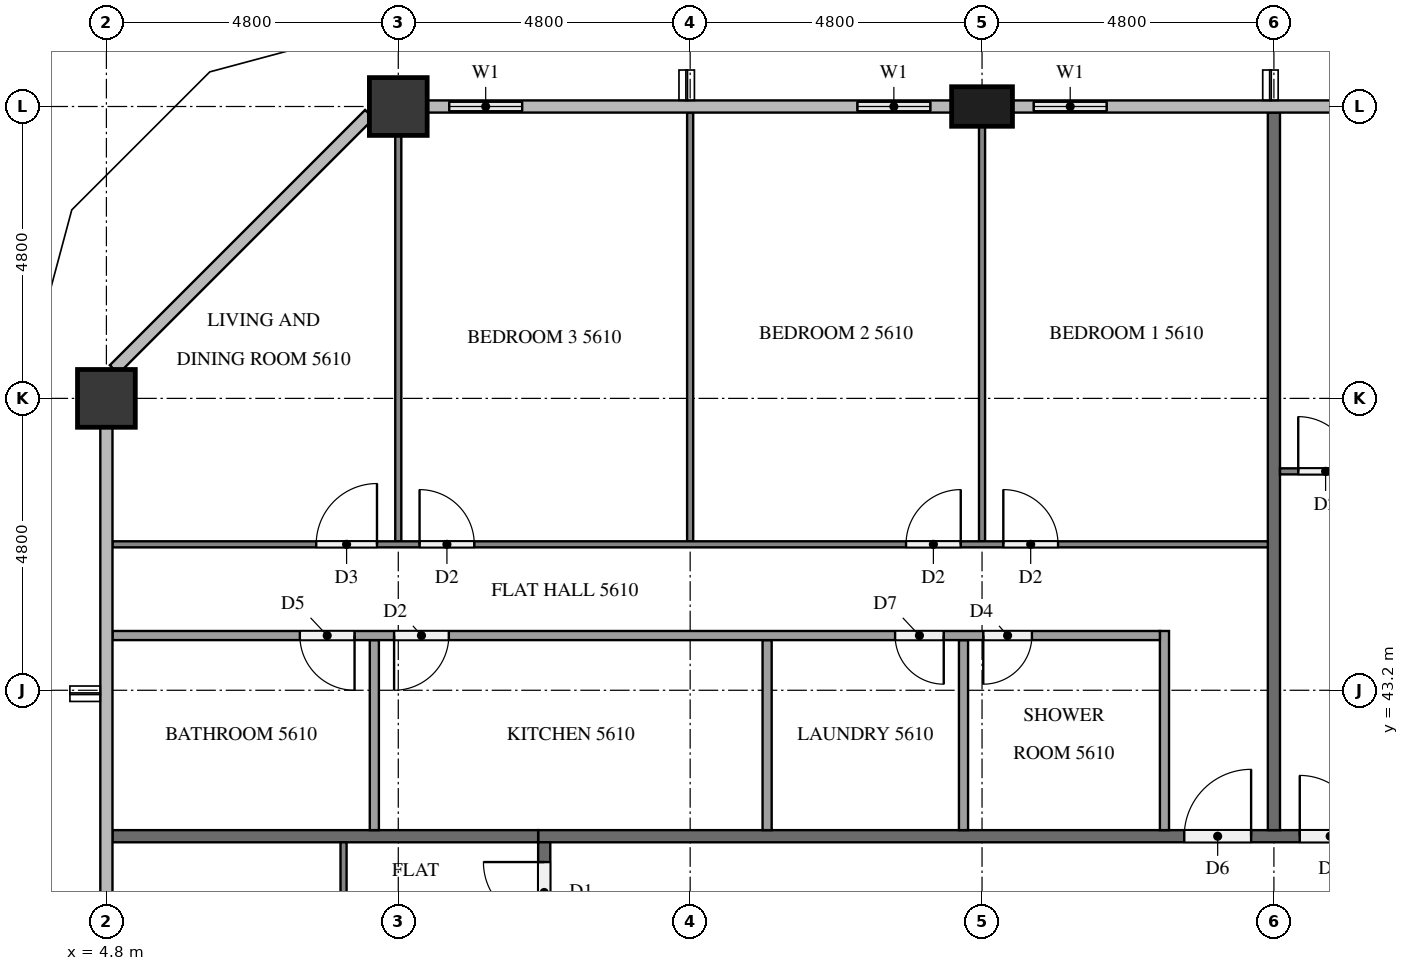
"""IFC4 building model, lengths in metres.
Left out: names, types, materials, properties, quantities, classifications, styles, units other than length and angle.
Written with IfcOpenShell. Run it as: python <this file> out.ifc"""

import sys

from ifc_helpers import new_model, si_unit, direction, frame, frame_2d, origin, origin_2d, place, context, subcontext, project, spatial, rectangle, extrude, element, fill, save


model = new_model("IFC4")
c1 = context("Model", 3, precision=1e-05, world=origin(), true_north=direction((0.0, 1.0)))
c2 = subcontext(c1, "Body", "Model", "MODEL_VIEW")
j1 = project(units=[si_unit("LENGTHUNIT", "METRE"), si_unit("PLANEANGLEUNIT", "RADIAN")], contexts=[c1])
p1 = place(None, origin())
s1 = spatial("IfcSite", under=j1, at=p1, CompositionType="ELEMENT")
p2 = place(p1, origin())
s2 = spatial("IfcBuilding", under=s1, at=p2, CompositionType="ELEMENT")
p3 = place(p2, frame((0.0, 0.0, 215.8)))
s3 = spatial("IfcBuildingStorey", under=s2, at=p3, CompositionType="ELEMENT", Elevation=215.8)
p4 = place(p3, frame((19.2, 52.8, 0.0), z_axis=(0.0, 0.0, 1.0), x_axis=(1.0, 0.0, 0.0)))
e1 = element("IfcColumn", 1, at=p4, inside=s3, PredefinedType="COLUMN", context=c2, shape_type="SweptSolid", body=[
    extrude(rectangle(XDim=1.0, YDim=0.65, at=origin_2d()), origin(), (0.0, 0.0, 1.0), 3.2),
])
for number, where, z_axis, x_axis in (
    (2, (9.6, 52.8, 0.0), (0.0, 0.0, 1.0), (1.0, 0.0, 0.0)),
    (3, (4.8, 48.0, 0.0), (0.0, 0.0, 1.0), (1.0, 0.0, 0.0)),
):
    element("IfcColumn", number, at=place(p3, frame(where, z_axis=z_axis, x_axis=x_axis)), inside=s3, PredefinedType="COLUMN", context=c2, shape_type="SweptSolid", body=[
        extrude(rectangle(XDim=0.95, YDim=0.95, at=origin_2d()), origin(), (0.0, 0.0, 1.0), 3.2),
    ])
p5 = place(p3, frame((21.6, 52.8, 0.0), z_axis=(0.0, 0.0, 1.0), x_axis=(-1.0, 0.0, 0.0)))
e4 = element("IfcWall", 4, at=p5, inside=s3, PredefinedType="SOLIDWALL", context=c2, shape_type="SweptSolid", body=[
    extrude(rectangle(XDim=1.9, YDim=0.15, at=frame_2d((0.95, 0.0))), origin(), (0.0, 0.0, 1.0), 3.2),
])
p6 = place(p5, frame((0.35, 0.0, 0.9)))
e5 = element("IfcOpeningElement", 5, at=p6, cuts=e4, PredefinedType="OPENING", context=c2, shape_type="SweptSolid", body=[
    extrude(rectangle(XDim=1.2, YDim=1.4, at=frame_2d((0.6, 0.7))), frame((0.0, 0.085, 0.0), z_axis=(0.0, -1.0, 0.0), x_axis=(1.0, 0.0, 0.0)), (0.0, 0.0, 1.0), 0.17),
])
p7 = place(p3, frame((18.7, 52.8, 0.0), z_axis=(0.0, 0.0, 1.0), x_axis=(-1.0, 0.0, 0.0)))
e6 = element("IfcWall", 6, at=p7, inside=s3, PredefinedType="SOLIDWALL", context=c2, shape_type="SweptSolid", body=[
    extrude(rectangle(XDim=1.9, YDim=0.15, at=frame_2d((0.95, 0.0))), origin(), (0.0, 0.0, 1.0), 3.2),
])
p8 = place(p7, frame((0.35, 0.0, 0.9)))
e7 = element("IfcOpeningElement", 7, at=p8, cuts=e6, PredefinedType="OPENING", context=c2, shape_type="SweptSolid", body=[
    extrude(rectangle(XDim=1.2, YDim=1.4, at=frame_2d((0.6, 0.7))), frame((0.0, 0.085, 0.0), z_axis=(0.0, -1.0, 0.0), x_axis=(1.0, 0.0, 0.0)), (0.0, 0.0, 1.0), 0.17),
])
p9 = place(p3, frame((12.0, 52.8, 0.0), z_axis=(0.0, 0.0, 1.0), x_axis=(-1.0, 0.0, 0.0)))
e8 = element("IfcWall", 8, at=p9, inside=s3, PredefinedType="SOLIDWALL", context=c2, shape_type="SweptSolid", body=[
    extrude(rectangle(XDim=1.925, YDim=0.15, at=frame_2d((0.962, 0.0))), origin(), (0.0, 0.0, 1.0), 3.2),
])
p10 = place(p9, frame((0.363, 0.0, 0.9)))
e9 = element("IfcOpeningElement", 9, at=p10, cuts=e8, PredefinedType="OPENING", context=c2, shape_type="SweptSolid", body=[
    extrude(rectangle(XDim=1.2, YDim=1.4, at=frame_2d((0.6, 0.7))), frame((0.0, 0.085, 0.0), z_axis=(0.0, -1.0, 0.0), x_axis=(1.0, 0.0, 0.0)), (0.0, 0.0, 1.0), 0.17),
])
p11 = place(p3, frame((11.9, 40.8, 0.0), z_axis=(0.0, 0.0, 1.0), x_axis=(1.0, 0.0, 0.0)))
e10 = element("IfcWall", 10, at=p11, inside=s3, PredefinedType="PARTITIONING", context=c2, shape_type="SweptSolid", body=[
    extrude(rectangle(XDim=38.6, YDim=0.2, at=frame_2d((19.3, 0.0))), origin(), (0.0, 0.0, 1.0), 3.2),
])
p12 = place(p11, frame((36.525, 0.0, 0.0)))
e11 = element("IfcOpeningElement", 11, at=p12, cuts=e10, PredefinedType="OPENING", context=c2, shape_type="SweptSolid", body=[
    extrude(rectangle(XDim=1.0, YDim=2.1, at=frame_2d((0.5, 1.05))), frame((0.0, 0.11, 0.0), z_axis=(0.0, -1.0, 0.0), x_axis=(1.0, 0.0, 0.0)), (0.0, 0.0, 1.0), 0.22),
])
p13 = place(p11, frame((29.325, 0.0, 0.0)))
e12 = element("IfcOpeningElement", 12, at=p13, cuts=e10, PredefinedType="OPENING", context=c2, shape_type="SweptSolid", body=[
    extrude(rectangle(XDim=1.0, YDim=2.1, at=frame_2d((0.5, 1.05))), frame((0.0, 0.11, 0.0), z_axis=(0.0, -1.0, 0.0), x_axis=(1.0, 0.0, 0.0)), (0.0, 0.0, 1.0), 0.22),
])
p14 = place(p11, frame((12.525, 0.0, 0.0)))
e13 = element("IfcOpeningElement", 13, at=p14, cuts=e10, PredefinedType="OPENING", context=c2, shape_type="SweptSolid", body=[
    extrude(rectangle(XDim=1.0, YDim=2.1, at=frame_2d((0.5, 1.05))), frame((0.0, 0.11, 0.0), z_axis=(0.0, -1.0, 0.0), x_axis=(1.0, 0.0, 0.0)), (0.0, 0.0, 1.0), 0.22),
])
p15 = place(p11, frame((10.625, 0.0, 0.0)))
e14 = element("IfcOpeningElement", 14, at=p15, cuts=e10, PredefinedType="OPENING", context=c2, shape_type="SweptSolid", body=[
    extrude(rectangle(XDim=1.1, YDim=2.1, at=frame_2d((0.55, 1.05))), frame((0.0, 0.11, 0.0), z_axis=(0.0, -1.0, 0.0), x_axis=(1.0, 0.0, 0.0)), (0.0, 0.0, 1.0), 0.22),
])
p16 = place(p3, frame((12.0, 12.1, 0.0), z_axis=(0.0, 0.0, 1.0), x_axis=(0.0, 1.0, 0.0)))
e15 = element("IfcWall", 15, at=p16, inside=s3, PredefinedType="PARTITIONING", context=c2, shape_type="SweptSolid", body=[
    extrude(rectangle(XDim=28.6, YDim=0.2, at=frame_2d((14.3, 0.0))), origin(), (0.0, 0.0, 1.0), 3.2),
])
p17 = place(p16, frame((27.275, 0.0, 0.0)))
e16 = element("IfcOpeningElement", 16, at=p17, cuts=e15, PredefinedType="OPENING", context=c2, shape_type="SweptSolid", body=[
    extrude(rectangle(XDim=1.0, YDim=2.1, at=frame_2d((0.5, 1.05))), frame((0.0, 0.11, 0.0), z_axis=(0.0, -1.0, 0.0), x_axis=(1.0, 0.0, 0.0)), (0.0, 0.0, 1.0), 0.22),
])
p18 = place(p16, frame((12.325, 0.0, 0.0)))
e17 = element("IfcOpeningElement", 17, at=p18, cuts=e15, PredefinedType="OPENING", context=c2, shape_type="SweptSolid", body=[
    extrude(rectangle(XDim=1.0, YDim=2.1, at=frame_2d((0.5, 1.05))), frame((0.0, 0.11, 0.0), z_axis=(0.0, -1.0, 0.0), x_axis=(1.0, 0.0, 0.0)), (0.0, 0.0, 1.0), 0.22),
])
p19 = place(p16, frame((2.725, 0.0, 0.0)))
e18 = element("IfcOpeningElement", 18, at=p19, cuts=e15, PredefinedType="OPENING", context=c2, shape_type="SweptSolid", body=[
    extrude(rectangle(XDim=1.0, YDim=2.1, at=frame_2d((0.5, 1.05))), frame((0.0, 0.11, 0.0), z_axis=(0.0, -1.0, 0.0), x_axis=(1.0, 0.0, 0.0)), (0.0, 0.0, 1.0), 0.22),
])
p20 = place(p16, frame((0.875, 0.0, 0.0)))
e19 = element("IfcOpeningElement", 19, at=p20, cuts=e15, PredefinedType="OPENING", context=c2, shape_type="SweptSolid", body=[
    extrude(rectangle(XDim=1.0, YDim=2.1, at=frame_2d((0.5, 1.05))), frame((0.0, 0.11, 0.0), z_axis=(0.0, -1.0, 0.0), x_axis=(1.0, 0.0, 0.0)), (0.0, 0.0, 1.0), 0.22),
])
p21 = place(p3, frame((24.0, 52.7, 0.0), z_axis=(0.0, 0.0, 1.0), x_axis=(0.0, -1.0, 0.0)))
e20 = element("IfcWall", 20, at=p21, inside=s3, PredefinedType="PARTITIONING", context=c2, shape_type="SweptSolid", body=[
    extrude(rectangle(XDim=11.8, YDim=0.2, at=frame_2d((5.9, 0.0))), origin(), (0.0, 0.0, 1.0), 3.2),
])
p22 = place(p3, frame((4.9, 40.8, 0.0), z_axis=(0.0, 0.0, 1.0), x_axis=(1.0, 0.0, 0.0)))
e21 = element("IfcWall", 21, at=p22, inside=s3, PredefinedType="PARTITIONING", context=c2, shape_type="SweptSolid", body=[
    extrude(rectangle(XDim=7.0, YDim=0.2, at=frame_2d((3.5, 0.0))), origin(), (0.0, 0.0, 1.0), 3.2),
])
p23 = place(p3, frame((24.1, 46.8, 0.0), z_axis=(0.0, 0.0, 1.0), x_axis=(1.0, 0.0, 0.0)))
e22 = element("IfcWall", 22, at=p23, inside=s3, PredefinedType="PARTITIONING", context=c2, shape_type="SweptSolid", body=[
    extrude(rectangle(XDim=16.6, YDim=0.1, at=frame_2d((8.3, 0.0))), origin(), (0.0, 0.0, 1.0), 3.2),
])
p24 = place(p23, frame((0.3, 0.0, 0.0)))
e23 = element("IfcOpeningElement", 23, at=p24, cuts=e22, PredefinedType="OPENING", context=c2, shape_type="SweptSolid", body=[
    extrude(rectangle(XDim=0.9, YDim=2.1, at=frame_2d((0.45, 1.05))), frame((0.0, 0.06, 0.0), z_axis=(0.0, -1.0, 0.0), x_axis=(1.0, 0.0, 0.0)), (0.0, 0.0, 1.0), 0.12),
])
p25 = place(p23, frame((10.55, 0.0, 0.0)))
e24 = element("IfcOpeningElement", 24, at=p25, cuts=e22, PredefinedType="OPENING", context=c2, shape_type="SweptSolid", body=[
    extrude(rectangle(XDim=1.0, YDim=2.1, at=frame_2d((0.5, 1.05))), frame((0.0, 0.06, 0.0), z_axis=(0.0, -1.0, 0.0), x_axis=(1.0, 0.0, 0.0)), (0.0, 0.0, 1.0), 0.12),
])
p26 = place(p23, frame((12.25, 0.0, 0.0)))
e25 = element("IfcOpeningElement", 25, at=p26, cuts=e22, PredefinedType="OPENING", context=c2, shape_type="SweptSolid", body=[
    extrude(rectangle(XDim=0.9, YDim=2.1, at=frame_2d((0.45, 1.05))), frame((0.0, 0.06, 0.0), z_axis=(0.0, -1.0, 0.0), x_axis=(1.0, 0.0, 0.0)), (0.0, 0.0, 1.0), 0.12),
])
p27 = place(p3, frame((19.2, 45.65, 0.0), z_axis=(0.0, 0.0, 1.0), x_axis=(0.0, 1.0, 0.0)))
e26 = element("IfcWall", 26, at=p27, inside=s3, PredefinedType="PARTITIONING", context=c2, shape_type="SweptSolid", body=[
    extrude(rectangle(XDim=6.825, YDim=0.1, at=frame_2d((3.413, 0.0))), origin(), (0.0, 0.0, 1.0), 3.2),
])
p28 = place(p3, frame((14.4, 45.65, 0.0), z_axis=(0.0, 0.0, 1.0), x_axis=(0.0, 1.0, 0.0)))
e27 = element("IfcWall", 27, at=p28, inside=s3, PredefinedType="PARTITIONING", context=c2, shape_type="SweptSolid", body=[
    extrude(rectangle(XDim=7.05, YDim=0.1, at=frame_2d((3.525, 0.0))), origin(), (0.0, 0.0, 1.0), 3.2),
])
p29 = place(p3, frame((9.6, 45.65, 0.0), z_axis=(0.0, 0.0, 1.0), x_axis=(0.0, 1.0, 0.0)))
e28 = element("IfcWall", 28, at=p29, inside=s3, PredefinedType="PARTITIONING", context=c2, shape_type="SweptSolid", body=[
    extrude(rectangle(XDim=6.675, YDim=0.1, at=frame_2d((3.337, 0.0))), origin(), (0.0, 0.0, 1.0), 3.2),
])
p30 = place(p3, frame((4.9, 45.6, 0.0), z_axis=(0.0, 0.0, 1.0), x_axis=(1.0, 0.0, 0.0)))
e29 = element("IfcWall", 29, at=p30, inside=s3, PredefinedType="PARTITIONING", context=c2, shape_type="SweptSolid", body=[
    extrude(rectangle(XDim=19.0, YDim=0.1, at=frame_2d((9.5, 0.0))), origin(), (0.0, 0.0, 1.0), 3.2),
])
p31 = place(p30, frame((14.65, 0.0, 0.0)))
e30 = element("IfcOpeningElement", 30, at=p31, cuts=e29, PredefinedType="OPENING", context=c2, shape_type="SweptSolid", body=[
    extrude(rectangle(XDim=0.9, YDim=2.1, at=frame_2d((0.45, 1.05))), frame((0.0, 0.06, 0.0), z_axis=(0.0, -1.0, 0.0), x_axis=(1.0, 0.0, 0.0)), (0.0, 0.0, 1.0), 0.12),
])
p32 = place(p30, frame((13.05, 0.0, 0.0)))
e31 = element("IfcOpeningElement", 31, at=p32, cuts=e29, PredefinedType="OPENING", context=c2, shape_type="SweptSolid", body=[
    extrude(rectangle(XDim=0.9, YDim=2.1, at=frame_2d((0.45, 1.05))), frame((0.0, 0.06, 0.0), z_axis=(0.0, -1.0, 0.0), x_axis=(1.0, 0.0, 0.0)), (0.0, 0.0, 1.0), 0.12),
])
p33 = place(p30, frame((5.05, 0.0, 0.0)))
e32 = element("IfcOpeningElement", 32, at=p33, cuts=e29, PredefinedType="OPENING", context=c2, shape_type="SweptSolid", body=[
    extrude(rectangle(XDim=0.9, YDim=2.1, at=frame_2d((0.45, 1.05))), frame((0.0, 0.06, 0.0), z_axis=(0.0, -1.0, 0.0), x_axis=(1.0, 0.0, 0.0)), (0.0, 0.0, 1.0), 0.12),
])
p34 = place(p30, frame((3.35, 0.0, 0.0)))
e33 = element("IfcOpeningElement", 33, at=p34, cuts=e29, PredefinedType="OPENING", context=c2, shape_type="SweptSolid", body=[
    extrude(rectangle(XDim=1.0, YDim=2.1, at=frame_2d((0.5, 1.05))), frame((0.0, 0.06, 0.0), z_axis=(0.0, -1.0, 0.0), x_axis=(1.0, 0.0, 0.0)), (0.0, 0.0, 1.0), 0.12),
])
for number, where, z_axis, x_axis in (
    (34, (18.895, 40.9, 0.0), (0.0, 0.0, 1.0), (0.0, 1.0, 0.0)),
    (35, (15.666, 40.9, 0.0), (0.0, 0.0, 1.0), (0.0, 1.0, 0.0)),
    (36, (9.206, 40.9, 0.0), (0.0, 0.0, 1.0), (0.0, 1.0, 0.0)),
):
    element("IfcWall", number, at=place(p3, frame(where, z_axis=z_axis, x_axis=x_axis)), inside=s3, PredefinedType="PARTITIONING", context=c2, shape_type="SweptSolid", body=[
        extrude(rectangle(XDim=3.125, YDim=0.15, at=frame_2d((1.562, 0.0))), origin(), (0.0, 0.0, 1.0), 3.2),
    ])
p35 = place(p3, frame((22.2, 40.9, 0.0), z_axis=(0.0, 0.0, 1.0), x_axis=(0.0, 1.0, 0.0)))
e37 = element("IfcWall", 37, at=p35, inside=s3, PredefinedType="PARTITIONING", context=c2, shape_type="SweptSolid", body=[
    extrude(rectangle(XDim=3.275, YDim=0.15, at=frame_2d((1.638, 0.0))), origin(), (0.0, 0.0, 1.0), 3.2),
])
p36 = place(p3, frame((22.125, 44.1, 0.0), z_axis=(0.0, 0.0, 1.0), x_axis=(-1.0, 0.0, 0.0)))
e38 = element("IfcWall", 38, at=p36, inside=s3, PredefinedType="PARTITIONING", context=c2, shape_type="SweptSolid", body=[
    extrude(rectangle(XDim=17.225, YDim=0.15, at=frame_2d((8.613, 0.0))), origin(), (0.0, 0.0, 1.0), 3.2),
])
p37 = place(p36, frame((2.105, 0.0, 0.0)))
e39 = element("IfcOpeningElement", 39, at=p37, cuts=e38, PredefinedType="OPENING", context=c2, shape_type="SweptSolid", body=[
    extrude(rectangle(XDim=0.8, YDim=2.1, at=frame_2d((0.4, 1.05))), frame((0.0, 0.085, 0.0), z_axis=(0.0, -1.0, 0.0), x_axis=(1.0, 0.0, 0.0)), (0.0, 0.0, 1.0), 0.17),
])
p38 = place(p36, frame((3.555, 0.0, 0.0)))
e40 = element("IfcOpeningElement", 40, at=p38, cuts=e38, PredefinedType="OPENING", context=c2, shape_type="SweptSolid", body=[
    extrude(rectangle(XDim=0.8, YDim=2.1, at=frame_2d((0.4, 1.05))), frame((0.0, 0.085, 0.0), z_axis=(0.0, -1.0, 0.0), x_axis=(1.0, 0.0, 0.0)), (0.0, 0.0, 1.0), 0.17),
])
p39 = place(p36, frame((11.694, 0.0, 0.0)))
e41 = element("IfcOpeningElement", 41, at=p39, cuts=e38, PredefinedType="OPENING", context=c2, shape_type="SweptSolid", body=[
    extrude(rectangle(XDim=0.9, YDim=2.1, at=frame_2d((0.45, 1.05))), frame((0.0, 0.085, 0.0), z_axis=(0.0, -1.0, 0.0), x_axis=(1.0, 0.0, 0.0)), (0.0, 0.0, 1.0), 0.17),
])
p40 = place(p36, frame((13.244, 0.0, 0.0)))
e42 = element("IfcOpeningElement", 42, at=p40, cuts=e38, PredefinedType="OPENING", context=c2, shape_type="SweptSolid", body=[
    extrude(rectangle(XDim=0.9, YDim=2.1, at=frame_2d((0.45, 1.05))), frame((0.0, 0.085, 0.0), z_axis=(0.0, -1.0, 0.0), x_axis=(1.0, 0.0, 0.0)), (0.0, 0.0, 1.0), 0.17),
])
p41 = place(p3, frame((8.7, 33.7, 0.0), z_axis=(0.0, 0.0, 1.0), x_axis=(0.0, 1.0, 0.0)))
e43 = element("IfcWall", 43, at=p41, inside=s3, PredefinedType="PARTITIONING", context=c2, shape_type="SweptSolid", body=[
    extrude(rectangle(XDim=7.0, YDim=0.1, at=frame_2d((3.5, 0.0))), origin(), (0.0, 0.0, 1.0), 3.2),
])
p42 = place(p41, frame((0.3, 0.0, 0.0)))
e44 = element("IfcOpeningElement", 44, at=p42, cuts=e43, PredefinedType="OPENING", context=c2, shape_type="SweptSolid", body=[
    extrude(rectangle(XDim=1.0, YDim=2.1, at=frame_2d((0.5, 1.05))), frame((0.0, 0.06, 0.0), z_axis=(0.0, -1.0, 0.0), x_axis=(1.0, 0.0, 0.0)), (0.0, 0.0, 1.0), 0.12),
])
p43 = place(p6, origin())
e45 = element("IfcWindow", 45, at=p43, inside=s3, PartitioningType="SINGLE_PANEL", PredefinedType="WINDOW", context=c2, shape_type="SweptSolid", body=[
    extrude(rectangle(XDim=1.2, YDim=1.4, at=frame_2d((0.6, 0.7))), frame((0.0, 0.03, 0.0), z_axis=(0.0, -1.0, 0.0), x_axis=(1.0, 0.0, 0.0)), (0.0, 0.0, 1.0), 0.06),
])
fill(e5, e45)
p44 = place(p8, origin())
e46 = element("IfcWindow", 46, at=p44, inside=s3, PartitioningType="SINGLE_PANEL", PredefinedType="WINDOW", context=c2, shape_type="SweptSolid", body=[
    extrude(rectangle(XDim=1.2, YDim=1.4, at=frame_2d((0.6, 0.7))), frame((0.0, 0.03, 0.0), z_axis=(0.0, -1.0, 0.0), x_axis=(1.0, 0.0, 0.0)), (0.0, 0.0, 1.0), 0.06),
])
fill(e7, e46)
p45 = place(p10, origin())
e47 = element("IfcWindow", 47, at=p45, inside=s3, PartitioningType="SINGLE_PANEL", PredefinedType="WINDOW", context=c2, shape_type="SweptSolid", body=[
    extrude(rectangle(XDim=1.2, YDim=1.4, at=frame_2d((0.6, 0.7))), frame((0.0, 0.03, 0.0), z_axis=(0.0, -1.0, 0.0), x_axis=(1.0, 0.0, 0.0)), (0.0, 0.0, 1.0), 0.06),
])
fill(e9, e47)
p46 = place(p14, origin())
e48 = element("IfcDoor", 48, at=p46, inside=s3, OperationType="SINGLE_SWING_LEFT", PredefinedType="DOOR", context=c2, shape_type="SweptSolid", body=[
    extrude(rectangle(XDim=1.0, YDim=2.1, at=frame_2d((0.5, 1.05))), frame((0.0, 0.025, 0.0), z_axis=(0.0, -1.0, 0.0), x_axis=(1.0, 0.0, 0.0)), (0.0, 0.0, 1.0), 0.05),
])
fill(e13, e48)
p47 = place(p15, origin())
e49 = element("IfcDoor", 49, at=p47, inside=s3, OperationType="SINGLE_SWING_RIGHT", PredefinedType="DOOR", context=c2, shape_type="SweptSolid", body=[
    extrude(rectangle(XDim=1.1, YDim=2.1, at=frame_2d((0.55, 1.05))), frame((0.0, 0.025, 0.0), z_axis=(0.0, -1.0, 0.0), x_axis=(1.0, 0.0, 0.0)), (0.0, 0.0, 1.0), 0.05),
])
fill(e14, e49)
p48 = place(p17, origin())
e50 = element("IfcDoor", 50, at=p48, inside=s3, OperationType="SINGLE_SWING_RIGHT", PredefinedType="DOOR", context=c2, shape_type="SweptSolid", body=[
    extrude(rectangle(XDim=1.0, YDim=2.1, at=frame_2d((0.5, 1.05))), frame((0.0, 0.025, 0.0), z_axis=(0.0, -1.0, 0.0), x_axis=(1.0, 0.0, 0.0)), (0.0, 0.0, 1.0), 0.05),
])
fill(e16, e50)
p49 = place(p24, origin())
e51 = element("IfcDoor", 51, at=p49, inside=s3, OperationType="SINGLE_SWING_LEFT", PredefinedType="DOOR", context=c2, shape_type="SweptSolid", body=[
    extrude(rectangle(XDim=0.9, YDim=2.1, at=frame_2d((0.45, 1.05))), frame((0.0, 0.025, 0.0), z_axis=(0.0, -1.0, 0.0), x_axis=(1.0, 0.0, 0.0)), (0.0, 0.0, 1.0), 0.05),
])
fill(e23, e51)
p50 = place(p31, origin())
e52 = element("IfcDoor", 52, at=p50, inside=s3, OperationType="SINGLE_SWING_LEFT", PredefinedType="DOOR", context=c2, shape_type="SweptSolid", body=[
    extrude(rectangle(XDim=0.9, YDim=2.1, at=frame_2d((0.45, 1.05))), frame((0.0, 0.025, 0.0), z_axis=(0.0, -1.0, 0.0), x_axis=(1.0, 0.0, 0.0)), (0.0, 0.0, 1.0), 0.05),
])
fill(e30, e52)
p51 = place(p32, origin())
e53 = element("IfcDoor", 53, at=p51, inside=s3, OperationType="SINGLE_SWING_RIGHT", PredefinedType="DOOR", context=c2, shape_type="SweptSolid", body=[
    extrude(rectangle(XDim=0.9, YDim=2.1, at=frame_2d((0.45, 1.05))), frame((0.0, 0.025, 0.0), z_axis=(0.0, -1.0, 0.0), x_axis=(1.0, 0.0, 0.0)), (0.0, 0.0, 1.0), 0.05),
])
fill(e31, e53)
p52 = place(p33, origin())
e54 = element("IfcDoor", 54, at=p52, inside=s3, OperationType="SINGLE_SWING_LEFT", PredefinedType="DOOR", context=c2, shape_type="SweptSolid", body=[
    extrude(rectangle(XDim=0.9, YDim=2.1, at=frame_2d((0.45, 1.05))), frame((0.0, 0.025, 0.0), z_axis=(0.0, -1.0, 0.0), x_axis=(1.0, 0.0, 0.0)), (0.0, 0.0, 1.0), 0.05),
])
fill(e32, e54)
p53 = place(p34, origin())
e55 = element("IfcDoor", 55, at=p53, inside=s3, OperationType="SINGLE_SWING_RIGHT", PredefinedType="DOOR", context=c2, shape_type="SweptSolid", body=[
    extrude(rectangle(XDim=1.0, YDim=2.1, at=frame_2d((0.5, 1.05))), frame((0.0, 0.025, 0.0), z_axis=(0.0, -1.0, 0.0), x_axis=(1.0, 0.0, 0.0)), (0.0, 0.0, 1.0), 0.05),
])
fill(e33, e55)
p54 = place(p37, origin())
e56 = element("IfcDoor", 56, at=p54, inside=s3, OperationType="SINGLE_SWING_RIGHT", PredefinedType="DOOR", context=c2, shape_type="SweptSolid", body=[
    extrude(rectangle(XDim=0.8, YDim=2.1, at=frame_2d((0.4, 1.05))), frame((0.0, 0.025, 0.0), z_axis=(0.0, -1.0, 0.0), x_axis=(1.0, 0.0, 0.0)), (0.0, 0.0, 1.0), 0.05),
])
fill(e39, e56)
p55 = place(p38, origin())
e57 = element("IfcDoor", 57, at=p55, inside=s3, OperationType="SINGLE_SWING_LEFT", PredefinedType="DOOR", context=c2, shape_type="SweptSolid", body=[
    extrude(rectangle(XDim=0.8, YDim=2.1, at=frame_2d((0.4, 1.05))), frame((0.0, 0.025, 0.0), z_axis=(0.0, -1.0, 0.0), x_axis=(1.0, 0.0, 0.0)), (0.0, 0.0, 1.0), 0.05),
])
fill(e40, e57)
p56 = place(p39, origin())
e58 = element("IfcDoor", 58, at=p56, inside=s3, OperationType="SINGLE_SWING_RIGHT", PredefinedType="DOOR", context=c2, shape_type="SweptSolid", body=[
    extrude(rectangle(XDim=0.9, YDim=2.1, at=frame_2d((0.45, 1.05))), frame((0.0, 0.025, 0.0), z_axis=(0.0, -1.0, 0.0), x_axis=(1.0, 0.0, 0.0)), (0.0, 0.0, 1.0), 0.05),
])
fill(e41, e58)
p57 = place(p40, origin())
e59 = element("IfcDoor", 59, at=p57, inside=s3, OperationType="SINGLE_SWING_LEFT", PredefinedType="DOOR", context=c2, shape_type="SweptSolid", body=[
    extrude(rectangle(XDim=0.9, YDim=2.1, at=frame_2d((0.45, 1.05))), frame((0.0, 0.025, 0.0), z_axis=(0.0, -1.0, 0.0), x_axis=(1.0, 0.0, 0.0)), (0.0, 0.0, 1.0), 0.05),
])
fill(e42, e59)
save(model, sys.argv[1])
